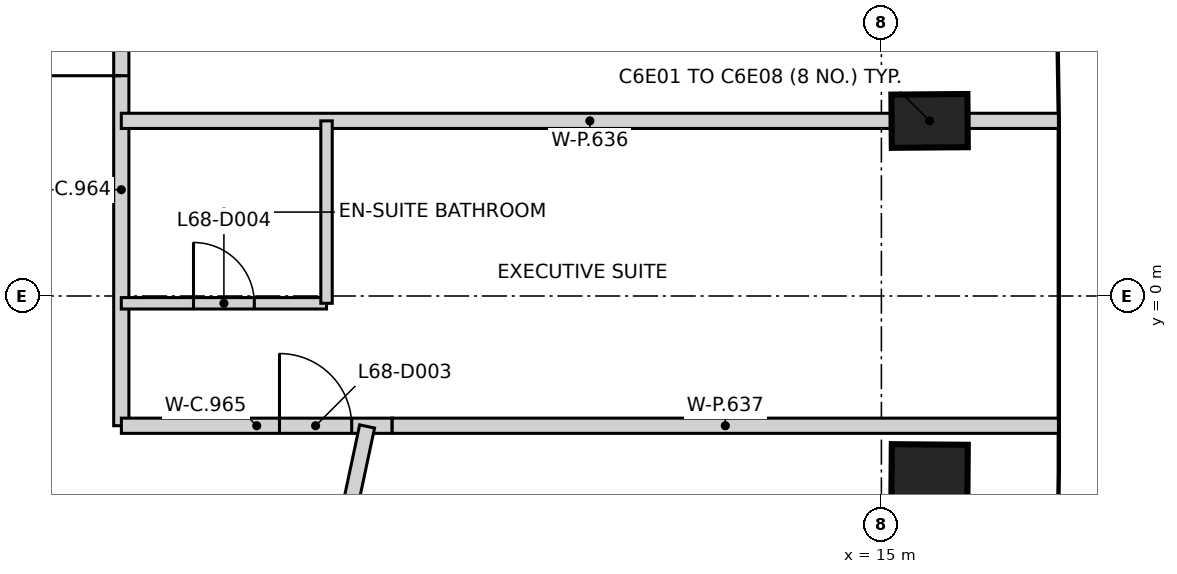
"""IFC4 building model, lengths in metres.
Left out: names, types, materials, properties, quantities, classifications, styles, units other than length and angle.
Written with IfcOpenShell. Run it as: python <this file> out.ifc"""

import sys

from ifc_helpers import new_model, si_unit, direction, frame, frame_2d, origin, origin_2d, place, context, subcontext, project, spatial, rectangle, extrude, element, fill, save


model = new_model("IFC4")
c1 = context("Model", 3, precision=1e-05, world=origin(), true_north=direction((0.0, 1.0)))
c2 = subcontext(c1, "Body", "Model", "MODEL_VIEW")
j1 = project(units=[si_unit("LENGTHUNIT", "METRE"), si_unit("PLANEANGLEUNIT", "RADIAN")], contexts=[c1])
p1 = place(None, origin())
s1 = spatial("IfcSite", under=j1, at=p1, CompositionType="ELEMENT")
p2 = place(p1, origin())
s2 = spatial("IfcBuilding", under=s1, at=p2, CompositionType="ELEMENT")
p3 = place(p2, frame((0.0, 0.0, 269.4)))
s3 = spatial("IfcBuildingStorey", under=s2, at=p3, CompositionType="ELEMENT", Elevation=269.4)
for number, where, z_axis, x_axis in (
    (1, (15.634, -2.303, -0.35), (0.0, 0.0, 1.0), (-1.0, 0.008, 0.0)),
    (2, (15.634, 2.303, -0.35), (0.0, 0.0, 1.0), (1.0, 0.008, 0.0)),
):
    element("IfcColumn", number, at=place(p3, frame(where, z_axis=z_axis, x_axis=x_axis)), inside=s3, PredefinedType="COLUMN", context=c2, shape_type="SweptSolid", body=[
        extrude(rectangle(XDim=1.0, YDim=0.7, at=origin_2d()), origin(), (0.0, 0.0, 1.0), 3.6),
    ])
p4 = place(p3, frame((5.0, -1.707, 0.0), z_axis=(0.0, 0.0, 1.0), x_axis=(0.0, 1.0, 0.0)))
e3 = element("IfcWall", 3, at=p4, inside=s3, PredefinedType="PARTITIONING", context=c2, shape_type="SweptSolid", body=[
    extrude(rectangle(XDim=6.211, YDim=0.2, at=frame_2d((3.105, 0.0))), origin(), (0.0, 0.0, 1.0), 3.25),
])
p5 = place(p4, frame((4.605, 0.0, 0.0)))
e4 = element("IfcOpeningElement", 4, at=p5, cuts=e3, PredefinedType="OPENING", context=c2, shape_type="SweptSolid", body=[
    extrude(rectangle(XDim=1.0, YDim=2.1, at=frame_2d((0.5, 1.05))), frame((0.0, 0.11, 0.0), z_axis=(0.0, -1.0, 0.0), x_axis=(1.0, 0.0, 0.0)), (0.0, 0.0, 1.0), 0.22),
])
p6 = place(p3, frame((5.001, -1.707, 0.0), z_axis=(0.0, 0.0, 1.0), x_axis=(1.0, 0.0, 0.0)))
e5 = element("IfcWall", 5, at=p6, inside=s3, PredefinedType="PARTITIONING", context=c2, shape_type="SweptSolid", body=[
    extrude(rectangle(XDim=3.562, YDim=0.2, at=frame_2d((1.781, 0.0))), origin(), (0.0, 0.0, 1.0), 3.25),
])
p7 = place(p6, frame((2.08, 0.0, 0.0)))
e6 = element("IfcOpeningElement", 6, at=p7, cuts=e5, PredefinedType="OPENING", context=c2, shape_type="SweptSolid", body=[
    extrude(rectangle(XDim=0.95, YDim=2.1, at=frame_2d((0.475, 1.05))), frame((0.0, 0.11, 0.0), z_axis=(0.0, -1.0, 0.0), x_axis=(1.0, 0.0, 0.0)), (0.0, 0.0, 1.0), 0.22),
])
p8 = place(p3, frame((7.673, -4.354, 0.0), z_axis=(0.0, 0.0, 1.0), x_axis=(0.207939957157, 0.978141592111, 0.0)))
e7 = element("IfcWall", 7, at=p8, inside=s3, PredefinedType="PARTITIONING", context=c2, shape_type="SweptSolid", body=[
    extrude(rectangle(XDim=2.697, YDim=0.2, at=frame_2d((1.348, 0.0))), origin(), (0.0, 0.0, 1.0), 3.25),
])
p9 = place(p3, frame((5.0, 2.304, 0.0), z_axis=(0.0, 0.0, 1.0), x_axis=(1.0, 0.0, 0.0)))
e8 = element("IfcWall", 8, at=p9, inside=s3, PredefinedType="PARTITIONING", context=c2, shape_type="SweptSolid", body=[
    extrude(rectangle(XDim=12.329, YDim=0.2, at=frame_2d((6.165, 0.0))), origin(), (0.0, 0.0, 1.0), 3.25),
])
p10 = place(p3, frame((8.564, -1.707, 0.0), z_axis=(0.0, 0.0, 1.0), x_axis=(1.0, 0.0, 0.0)))
e9 = element("IfcWall", 9, at=p10, inside=s3, PredefinedType="PARTITIONING", context=c2, shape_type="SweptSolid", body=[
    extrude(rectangle(XDim=8.765, YDim=0.2, at=frame_2d((4.383, 0.0))), origin(), (0.0, 0.0, 1.0), 2.35),
])
p11 = place(p3, frame((5.0, -0.096, 0.0), z_axis=(0.0, 0.0, 1.0), x_axis=(1.0, 0.0, 0.0)))
e10 = element("IfcWall", 10, at=p11, inside=s3, PredefinedType="PARTITIONING", context=c2, shape_type="SweptSolid", body=[
    extrude(rectangle(XDim=2.7, YDim=0.15, at=frame_2d((1.35, 0.0))), origin(), (0.0, 0.0, 1.0), 3.25),
])
p12 = place(p11, frame((0.95, 0.0, 0.0)))
e11 = element("IfcOpeningElement", 11, at=p12, cuts=e10, PredefinedType="OPENING", context=c2, shape_type="SweptSolid", body=[
    extrude(rectangle(XDim=0.8, YDim=2.1, at=frame_2d((0.4, 1.05))), frame((0.0, 0.085, 0.0), z_axis=(0.0, -1.0, 0.0), x_axis=(1.0, 0.0, 0.0)), (0.0, 0.0, 1.0), 0.17),
])
p13 = place(p3, frame((7.7, -0.096, 0.0), z_axis=(0.0, 0.0, 1.0), x_axis=(0.0, 1.0, 0.0)))
e12 = element("IfcWall", 12, at=p13, inside=s3, PredefinedType="PARTITIONING", context=c2, shape_type="SweptSolid", body=[
    extrude(rectangle(XDim=2.4, YDim=0.15, at=frame_2d((1.2, 0.0))), origin(), (0.0, 0.0, 1.0), 3.25),
])
p14 = place(p7, origin())
e13 = element("IfcDoor", 13, at=p14, inside=s3, OperationType="SINGLE_SWING_LEFT", PredefinedType="DOOR", context=c2, shape_type="SweptSolid", body=[
    extrude(rectangle(XDim=0.95, YDim=2.1, at=frame_2d((0.475, 1.05))), frame((0.0, 0.025, 0.0), z_axis=(0.0, -1.0, 0.0), x_axis=(1.0, 0.0, 0.0)), (0.0, 0.0, 1.0), 0.05),
])
fill(e6, e13)
p15 = place(p12, origin())
e14 = element("IfcDoor", 14, at=p15, inside=s3, OperationType="SINGLE_SWING_LEFT", PredefinedType="DOOR", context=c2, shape_type="SweptSolid", body=[
    extrude(rectangle(XDim=0.8, YDim=2.1, at=frame_2d((0.4, 1.05))), frame((0.0, 0.025, 0.0), z_axis=(0.0, -1.0, 0.0), x_axis=(1.0, 0.0, 0.0)), (0.0, 0.0, 1.0), 0.05),
])
fill(e11, e14)
p16 = place(p5, frame((1.0, 0.0, 0.0), z_axis=(0.0, 0.0, 1.0), x_axis=(-1.0, 0.0, 0.0)))
e15 = element("IfcDoor", 15, at=p16, inside=s3, OperationType="SINGLE_SWING_LEFT", PredefinedType="DOOR", context=c2, shape_type="SweptSolid", body=[
    extrude(rectangle(XDim=1.0, YDim=2.1, at=frame_2d((0.5, 1.05))), frame((0.0, 0.025, 0.0), z_axis=(0.0, -1.0, 0.0), x_axis=(1.0, 0.0, 0.0)), (0.0, 0.0, 1.0), 0.05),
])
fill(e4, e15)
save(model, sys.argv[1])
